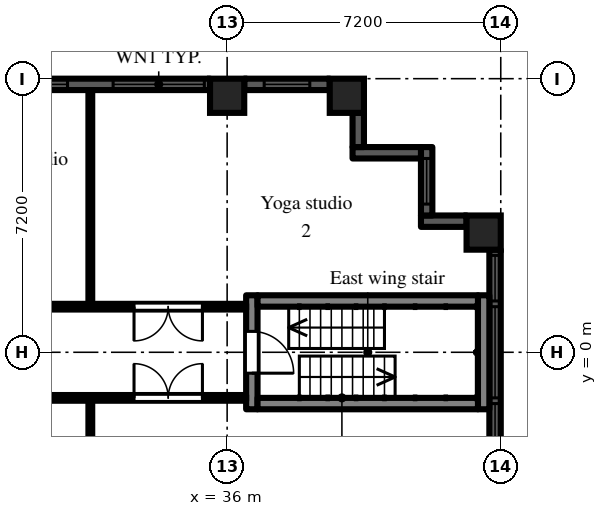
"""IFC4 building model, lengths in metres.
Left out: names, types, materials, properties, quantities, classifications, styles, units other than length and angle.
Written with IfcOpenShell. Run it as: python <this file> out.ifc"""

import sys

from ifc_helpers import new_model, si_unit, direction, frame, frame_2d, origin, origin_2d, place, context, subcontext, project, spatial, rectangle, extrude, element, fill, save


model = new_model("IFC4")
c1 = context("Model", 3, precision=1e-05, world=origin(), true_north=direction((0.0, 1.0)))
c2 = subcontext(c1, "Body", "Model", "MODEL_VIEW")
j1 = project(units=[si_unit("LENGTHUNIT", "METRE"), si_unit("PLANEANGLEUNIT", "RADIAN")], contexts=[c1])
p1 = place(None, origin())
s1 = spatial("IfcSite", under=j1, at=p1, CompositionType="ELEMENT")
p2 = place(p1, origin())
s2 = spatial("IfcBuilding", under=s1, at=p2, CompositionType="ELEMENT")
p3 = place(p2, frame((0.0, 0.0, 108.9)))
s3 = spatial("IfcBuildingStorey", under=s2, at=p3, CompositionType="ELEMENT", Elevation=108.9)
for number, where, z_axis, x_axis in (
    (1, (36.0, 6.75, 0.0), (0.0, 0.0, 1.0), (1.0, 0.0, 0.0)),
    (2, (39.15, 6.75, 0.0), (0.0, 0.0, 1.0), (1.0, 0.0, 0.0)),
    (3, (42.75, 3.15, 0.0), (0.0, 0.0, 1.0), (1.0, 0.0, 0.0)),
):
    element("IfcColumn", number, at=place(p3, frame(where, z_axis=z_axis, x_axis=x_axis)), inside=s3, PredefinedType="COLUMN", context=c2, shape_type="SweptSolid", body=[
        extrude(rectangle(XDim=0.9, YDim=0.9, at=origin_2d()), origin(), (0.0, 0.0, 1.0), 3.0),
    ])
p4 = place(p3, frame((43.05, -2.7, 0.0), z_axis=(0.0, 0.0, 1.0), x_axis=(0.0, 1.0, 0.0)))
e4 = element("IfcWall", 4, at=p4, inside=s3, PredefinedType="SOLIDWALL", context=c2, shape_type="SweptSolid", body=[
    extrude(rectangle(XDim=5.4, YDim=0.3, at=frame_2d((2.7, 0.0))), origin(), (0.0, 0.0, 1.0), 2.2),
])
p5 = place(p4, frame((1.5, 0.0, 0.2)))
e5 = element("IfcOpeningElement", 5, at=p5, cuts=e4, PredefinedType="OPENING", context=c2, shape_type="SweptSolid", body=[
    extrude(rectangle(XDim=2.4, YDim=1.85, at=frame_2d((1.2, 0.925))), frame((0.0, 0.16, 0.0), z_axis=(0.0, -1.0, 0.0), x_axis=(1.0, 0.0, 0.0)), (0.0, 0.0, 1.0), 0.32),
])
p6 = place(p4, frame((0.15, 0.0, 0.2)))
e6 = element("IfcOpeningElement", 6, at=p6, cuts=e4, PredefinedType="OPENING", context=c2, shape_type="SweptSolid", body=[
    extrude(rectangle(XDim=1.2, YDim=1.85, at=frame_2d((0.6, 0.925))), frame((0.0, 0.16, 0.0), z_axis=(0.0, -1.0, 0.0), x_axis=(1.0, 0.0, 0.0)), (0.0, 0.0, 1.0), 0.32),
])
p7 = place(p4, frame((4.05, 0.0, 0.2)))
e7 = element("IfcOpeningElement", 7, at=p7, cuts=e4, PredefinedType="OPENING", context=c2, shape_type="SweptSolid", body=[
    extrude(rectangle(XDim=1.2, YDim=1.85, at=frame_2d((0.6, 0.925))), frame((0.0, 0.16, 0.0), z_axis=(0.0, -1.0, 0.0), x_axis=(1.0, 0.0, 0.0)), (0.0, 0.0, 1.0), 0.32),
])
p8 = place(p3, frame((42.3, 3.45, 0.0), z_axis=(0.0, 0.0, 1.0), x_axis=(-1.0, 0.0, 0.0)))
e8 = element("IfcWall", 8, at=p8, inside=s3, PredefinedType="SOLIDWALL", context=c2, shape_type="SweptSolid", body=[
    extrude(rectangle(XDim=1.2, YDim=0.3, at=frame_2d((0.6, 0.0))), origin(), (0.0, 0.0, 1.0), 2.55),
])
p9 = place(p3, frame((41.25, 3.6, 0.0), z_axis=(0.0, 0.0, 1.0), x_axis=(0.0, 1.0, 0.0)))
e9 = element("IfcWall", 9, at=p9, inside=s3, PredefinedType="SOLIDWALL", context=c2, shape_type="SweptSolid", body=[
    extrude(rectangle(XDim=1.8, YDim=0.3, at=frame_2d((0.9, 0.0))), origin(), (0.0, 0.0, 1.0), 2.55),
])
p10 = place(p9, frame((0.3, 0.0, 0.2)))
e10 = element("IfcOpeningElement", 10, at=p10, cuts=e9, PredefinedType="OPENING", context=c2, shape_type="SweptSolid", body=[
    extrude(rectangle(XDim=1.2, YDim=1.85, at=frame_2d((0.6, 0.925))), frame((0.0, 0.16, 0.0), z_axis=(0.0, -1.0, 0.0), x_axis=(1.0, 0.0, 0.0)), (0.0, 0.0, 1.0), 0.32),
])
p11 = place(p3, frame((41.1, 5.25, 0.0), z_axis=(0.0, 0.0, 1.0), x_axis=(-1.0, 0.0, 0.0)))
e11 = element("IfcWall", 11, at=p11, inside=s3, PredefinedType="SOLIDWALL", context=c2, shape_type="SweptSolid", body=[
    extrude(rectangle(XDim=1.8, YDim=0.3, at=frame_2d((0.9, 0.0))), origin(), (0.0, 0.0, 1.0), 2.55),
])
p12 = place(p3, frame((39.45, 5.4, 0.0), z_axis=(0.0, 0.0, 1.0), x_axis=(0.0, 1.0, 0.0)))
e12 = element("IfcWall", 12, at=p12, inside=s3, PredefinedType="SOLIDWALL", context=c2, shape_type="SweptSolid", body=[
    extrude(rectangle(XDim=0.9, YDim=0.3, at=frame_2d((0.45, 0.0))), origin(), (0.0, 0.0, 1.0), 2.55),
])
p13 = place(p3, frame((38.7, 7.05, 0.0), z_axis=(0.0, 0.0, 1.0), x_axis=(-1.0, 0.0, 0.0)))
e13 = element("IfcWall", 13, at=p13, inside=s3, PredefinedType="SOLIDWALL", context=c2, shape_type="SweptSolid", body=[
    extrude(rectangle(XDim=2.25, YDim=0.3, at=frame_2d((1.125, 0.0))), origin(), (0.0, 0.0, 1.0), 2.2),
])
p14 = place(p13, frame((0.525, 0.0, 0.2)))
e14 = element("IfcOpeningElement", 14, at=p14, cuts=e13, PredefinedType="OPENING", context=c2, shape_type="SweptSolid", body=[
    extrude(rectangle(XDim=1.2, YDim=1.85, at=frame_2d((0.6, 0.925))), frame((0.0, 0.16, 0.0), z_axis=(0.0, -1.0, 0.0), x_axis=(1.0, 0.0, 0.0)), (0.0, 0.0, 1.0), 0.32),
])
p15 = place(p3, frame((35.55, 7.05, 0.0), z_axis=(0.0, 0.0, 1.0), x_axis=(-1.0, 0.0, 0.0)))
e15 = element("IfcWall", 15, at=p15, inside=s3, PredefinedType="SOLIDWALL", context=c2, shape_type="SweptSolid", body=[
    extrude(rectangle(XDim=6.3, YDim=0.3, at=frame_2d((3.15, 0.0))), origin(), (0.0, 0.0, 1.0), 2.2),
])
p16 = place(p15, frame((0.15, 0.0, 0.2)))
e16 = element("IfcOpeningElement", 16, at=p16, cuts=e15, PredefinedType="OPENING", context=c2, shape_type="SweptSolid", body=[
    extrude(rectangle(XDim=2.4, YDim=1.85, at=frame_2d((1.2, 0.925))), frame((0.0, 0.16, 0.0), z_axis=(0.0, -1.0, 0.0), x_axis=(1.0, 0.0, 0.0)), (0.0, 0.0, 1.0), 0.32),
])
p17 = place(p15, frame((3.75, 0.0, 0.2)))
e17 = element("IfcOpeningElement", 17, at=p17, cuts=e15, PredefinedType="OPENING", context=c2, shape_type="SweptSolid", body=[
    extrude(rectangle(XDim=2.4, YDim=1.85, at=frame_2d((1.2, 0.925))), frame((0.0, 0.16, 0.0), z_axis=(0.0, -1.0, 0.0), x_axis=(1.0, 0.0, 0.0)), (0.0, 0.0, 1.0), 0.32),
])
p18 = place(p3, frame((36.65, -1.5, 0.0), z_axis=(0.0, 0.0, 1.0), x_axis=(0.0, 1.0, 0.0)))
e18 = element("IfcWall", 18, at=p18, inside=s3, PredefinedType="SHEAR", context=c2, shape_type="SweptSolid", body=[
    extrude(rectangle(XDim=3.0, YDim=0.3, at=frame_2d((1.5, 0.0))), origin(), (0.0, 0.0, 1.0), 2.55),
])
p19 = place(p18, frame((0.95, 0.0, 0.0)))
e19 = element("IfcOpeningElement", 19, at=p19, cuts=e18, PredefinedType="OPENING", context=c2, shape_type="SweptSolid", body=[
    extrude(rectangle(XDim=1.1, YDim=2.1, at=frame_2d((0.55, 1.05))), frame((0.0, 0.16, 0.0), z_axis=(0.0, -1.0, 0.0), x_axis=(1.0, 0.0, 0.0)), (0.0, 0.0, 1.0), 0.32),
])
p20 = place(p3, frame((42.75, -1.5, 0.0), z_axis=(0.0, 0.0, 1.0), x_axis=(0.0, 1.0, 0.0)))
e20 = element("IfcWall", 20, at=p20, inside=s3, PredefinedType="SHEAR", context=c2, shape_type="SweptSolid", body=[
    extrude(rectangle(XDim=3.0, YDim=0.3, at=frame_2d((1.5, 0.0))), origin(), (0.0, 0.0, 1.0), 2.55),
])
for number, where, z_axis, x_axis in (
    (21, (36.8, -1.35, 0.0), (0.0, 0.0, 1.0), (1.0, 0.0, 0.0)),
    (22, (36.8, 1.35, 0.0), (0.0, 0.0, 1.0), (1.0, 0.0, 0.0)),
):
    element("IfcWall", number, at=place(p3, frame(where, z_axis=z_axis, x_axis=x_axis)), inside=s3, PredefinedType="SHEAR", context=c2, shape_type="SweptSolid", body=[
        extrude(rectangle(XDim=5.8, YDim=0.3, at=frame_2d((2.9, 0.0))), origin(), (0.0, 0.0, 1.0), 2.55),
    ])
p21 = place(p3, frame((21.6, -1.2, 0.0), z_axis=(0.0, 0.0, 1.0), x_axis=(1.0, 0.0, 0.0)))
e23 = element("IfcWall", 23, at=p21, inside=s3, PredefinedType="PARTITIONING", context=c2, shape_type="SweptSolid", body=[
    extrude(rectangle(XDim=14.9, YDim=0.15, at=frame_2d((7.45, 0.0))), origin(), (0.0, 0.0, 1.0), 2.55),
])
p22 = place(p21, frame((0.2, 0.0, 0.0)))
e24 = element("IfcOpeningElement", 24, at=p22, cuts=e23, PredefinedType="OPENING", context=c2, shape_type="SweptSolid", body=[
    extrude(rectangle(XDim=1.0, YDim=2.1, at=frame_2d((0.5, 1.05))), frame((0.0, 0.085, 0.0), z_axis=(0.0, -1.0, 0.0), x_axis=(1.0, 0.0, 0.0)), (0.0, 0.0, 1.0), 0.17),
])
p23 = place(p21, frame((5.71, 0.0, 0.0)))
e25 = element("IfcOpeningElement", 25, at=p23, cuts=e23, PredefinedType="OPENING", context=c2, shape_type="SweptSolid", body=[
    extrude(rectangle(XDim=1.0, YDim=2.1, at=frame_2d((0.5, 1.05))), frame((0.0, 0.085, 0.0), z_axis=(0.0, -1.0, 0.0), x_axis=(1.0, 0.0, 0.0)), (0.0, 0.0, 1.0), 0.17),
])
p24 = place(p21, frame((11.95, 0.0, 0.0)))
e26 = element("IfcOpeningElement", 26, at=p24, cuts=e23, PredefinedType="OPENING", context=c2, shape_type="SweptSolid", body=[
    extrude(rectangle(XDim=1.8, YDim=2.1, at=frame_2d((0.9, 1.05))), frame((0.0, 0.085, 0.0), z_axis=(0.0, -1.0, 0.0), x_axis=(1.0, 0.0, 0.0)), (0.0, 0.0, 1.0), 0.17),
])
p25 = place(p3, frame((21.6, 1.2, 0.0), z_axis=(0.0, 0.0, 1.0), x_axis=(1.0, 0.0, 0.0)))
e27 = element("IfcWall", 27, at=p25, inside=s3, PredefinedType="PARTITIONING", context=c2, shape_type="SweptSolid", body=[
    extrude(rectangle(XDim=14.9, YDim=0.15, at=frame_2d((7.45, 0.0))), origin(), (0.0, 0.0, 1.0), 2.55),
])
p26 = place(p25, frame((0.45, 0.0, 0.0)))
e28 = element("IfcOpeningElement", 28, at=p26, cuts=e27, PredefinedType="OPENING", context=c2, shape_type="SweptSolid", body=[
    extrude(rectangle(XDim=0.9, YDim=2.1, at=frame_2d((0.45, 1.05))), frame((0.0, 0.085, 0.0), z_axis=(0.0, -1.0, 0.0), x_axis=(1.0, 0.0, 0.0)), (0.0, 0.0, 1.0), 0.17),
])
p27 = place(p25, frame((2.25, 0.0, 0.0)))
e29 = element("IfcOpeningElement", 29, at=p27, cuts=e27, PredefinedType="OPENING", context=c2, shape_type="SweptSolid", body=[
    extrude(rectangle(XDim=0.9, YDim=2.1, at=frame_2d((0.45, 1.05))), frame((0.0, 0.085, 0.0), z_axis=(0.0, -1.0, 0.0), x_axis=(1.0, 0.0, 0.0)), (0.0, 0.0, 1.0), 0.17),
])
p28 = place(p25, frame((6.3, 0.0, 0.0)))
e30 = element("IfcOpeningElement", 30, at=p28, cuts=e27, PredefinedType="OPENING", context=c2, shape_type="SweptSolid", body=[
    extrude(rectangle(XDim=1.8, YDim=2.1, at=frame_2d((0.9, 1.05))), frame((0.0, 0.085, 0.0), z_axis=(0.0, -1.0, 0.0), x_axis=(1.0, 0.0, 0.0)), (0.0, 0.0, 1.0), 0.17),
])
p29 = place(p25, frame((11.95, 0.0, 0.0)))
e31 = element("IfcOpeningElement", 31, at=p29, cuts=e27, PredefinedType="OPENING", context=c2, shape_type="SweptSolid", body=[
    extrude(rectangle(XDim=1.8, YDim=2.1, at=frame_2d((0.9, 1.05))), frame((0.0, 0.085, 0.0), z_axis=(0.0, -1.0, 0.0), x_axis=(1.0, 0.0, 0.0)), (0.0, 0.0, 1.0), 0.17),
])
for number, where, z_axis, x_axis in (
    (32, (32.4, -6.9, 0.0), (0.0, 0.0, 1.0), (0.0, 1.0, 0.0)),
    (33, (32.4, 1.275, 0.0), (0.0, 0.0, 1.0), (0.0, 1.0, 0.0)),
):
    element("IfcWall", number, at=place(p3, frame(where, z_axis=z_axis, x_axis=x_axis)), inside=s3, PredefinedType="PARTITIONING", context=c2, shape_type="SweptSolid", body=[
        extrude(rectangle(XDim=5.625, YDim=0.1, at=frame_2d((2.812, 0.0))), origin(), (0.0, 0.0, 1.0), 2.55),
    ])
p30 = place(p5, origin())
e34 = element("IfcWindow", 34, at=p30, inside=s3, PartitioningType="SINGLE_PANEL", PredefinedType="WINDOW", context=c2, shape_type="SweptSolid", body=[
    extrude(rectangle(XDim=2.4, YDim=1.85, at=frame_2d((1.2, 0.925))), frame((0.0, 0.03, 0.0), z_axis=(0.0, -1.0, 0.0), x_axis=(1.0, 0.0, 0.0)), (0.0, 0.0, 1.0), 0.06),
])
fill(e5, e34)
p31 = place(p6, origin())
e35 = element("IfcWindow", 35, at=p31, inside=s3, PartitioningType="SINGLE_PANEL", PredefinedType="WINDOW", context=c2, shape_type="SweptSolid", body=[
    extrude(rectangle(XDim=1.2, YDim=1.85, at=frame_2d((0.6, 0.925))), frame((0.0, 0.03, 0.0), z_axis=(0.0, -1.0, 0.0), x_axis=(1.0, 0.0, 0.0)), (0.0, 0.0, 1.0), 0.06),
])
fill(e6, e35)
p32 = place(p7, origin())
e36 = element("IfcWindow", 36, at=p32, inside=s3, PartitioningType="SINGLE_PANEL", PredefinedType="WINDOW", context=c2, shape_type="SweptSolid", body=[
    extrude(rectangle(XDim=1.2, YDim=1.85, at=frame_2d((0.6, 0.925))), frame((0.0, 0.03, 0.0), z_axis=(0.0, -1.0, 0.0), x_axis=(1.0, 0.0, 0.0)), (0.0, 0.0, 1.0), 0.06),
])
fill(e7, e36)
p33 = place(p10, origin())
e37 = element("IfcWindow", 37, at=p33, inside=s3, PartitioningType="SINGLE_PANEL", PredefinedType="WINDOW", context=c2, shape_type="SweptSolid", body=[
    extrude(rectangle(XDim=1.2, YDim=1.85, at=frame_2d((0.6, 0.925))), frame((0.0, 0.03, 0.0), z_axis=(0.0, -1.0, 0.0), x_axis=(1.0, 0.0, 0.0)), (0.0, 0.0, 1.0), 0.06),
])
fill(e10, e37)
p34 = place(p14, origin())
e38 = element("IfcWindow", 38, at=p34, inside=s3, PartitioningType="SINGLE_PANEL", PredefinedType="WINDOW", context=c2, shape_type="SweptSolid", body=[
    extrude(rectangle(XDim=1.2, YDim=1.85, at=frame_2d((0.6, 0.925))), frame((0.0, 0.03, 0.0), z_axis=(0.0, -1.0, 0.0), x_axis=(1.0, 0.0, 0.0)), (0.0, 0.0, 1.0), 0.06),
])
fill(e14, e38)
p35 = place(p16, origin())
e39 = element("IfcWindow", 39, at=p35, inside=s3, PartitioningType="SINGLE_PANEL", PredefinedType="WINDOW", context=c2, shape_type="SweptSolid", body=[
    extrude(rectangle(XDim=2.4, YDim=1.85, at=frame_2d((1.2, 0.925))), frame((0.0, 0.03, 0.0), z_axis=(0.0, -1.0, 0.0), x_axis=(1.0, 0.0, 0.0)), (0.0, 0.0, 1.0), 0.06),
])
fill(e16, e39)
p36 = place(p17, origin())
e40 = element("IfcWindow", 40, at=p36, inside=s3, PartitioningType="SINGLE_PANEL", PredefinedType="WINDOW", context=c2, shape_type="SweptSolid", body=[
    extrude(rectangle(XDim=2.4, YDim=1.85, at=frame_2d((1.2, 0.925))), frame((0.0, 0.03, 0.0), z_axis=(0.0, -1.0, 0.0), x_axis=(1.0, 0.0, 0.0)), (0.0, 0.0, 1.0), 0.06),
])
fill(e17, e40)
p37 = place(p19, frame((1.1, 0.0, 0.0), z_axis=(0.0, 0.0, 1.0), x_axis=(-1.0, 0.0, 0.0)))
e41 = element("IfcDoor", 41, at=p37, inside=s3, OperationType="SINGLE_SWING_RIGHT", PredefinedType="DOOR", context=c2, shape_type="SweptSolid", body=[
    extrude(rectangle(XDim=1.1, YDim=2.1, at=frame_2d((0.55, 1.05))), frame((0.0, 0.025, 0.0), z_axis=(0.0, -1.0, 0.0), x_axis=(1.0, 0.0, 0.0)), (0.0, 0.0, 1.0), 0.05),
])
fill(e19, e41)
p38 = place(p29, frame((1.8, 0.0, 0.0), z_axis=(0.0, 0.0, 1.0), x_axis=(-1.0, 0.0, 0.0)))
e42 = element("IfcDoor", 42, at=p38, inside=s3, OperationType="DOUBLE_DOOR_DOUBLE_SWING", PredefinedType="DOOR", context=c2, shape_type="SweptSolid", body=[
    extrude(rectangle(XDim=1.8, YDim=2.1, at=frame_2d((0.9, 1.05))), frame((0.0, 0.025, 0.0), z_axis=(0.0, -1.0, 0.0), x_axis=(1.0, 0.0, 0.0)), (0.0, 0.0, 1.0), 0.05),
])
fill(e31, e42)
p39 = place(p24, origin())
e43 = element("IfcDoor", 43, at=p39, inside=s3, OperationType="DOUBLE_DOOR_DOUBLE_SWING", PredefinedType="DOOR", context=c2, shape_type="SweptSolid", body=[
    extrude(rectangle(XDim=1.8, YDim=2.1, at=frame_2d((0.9, 1.05))), frame((0.0, 0.025, 0.0), z_axis=(0.0, -1.0, 0.0), x_axis=(1.0, 0.0, 0.0)), (0.0, 0.0, 1.0), 0.05),
])
fill(e26, e43)
save(model, sys.argv[1])
